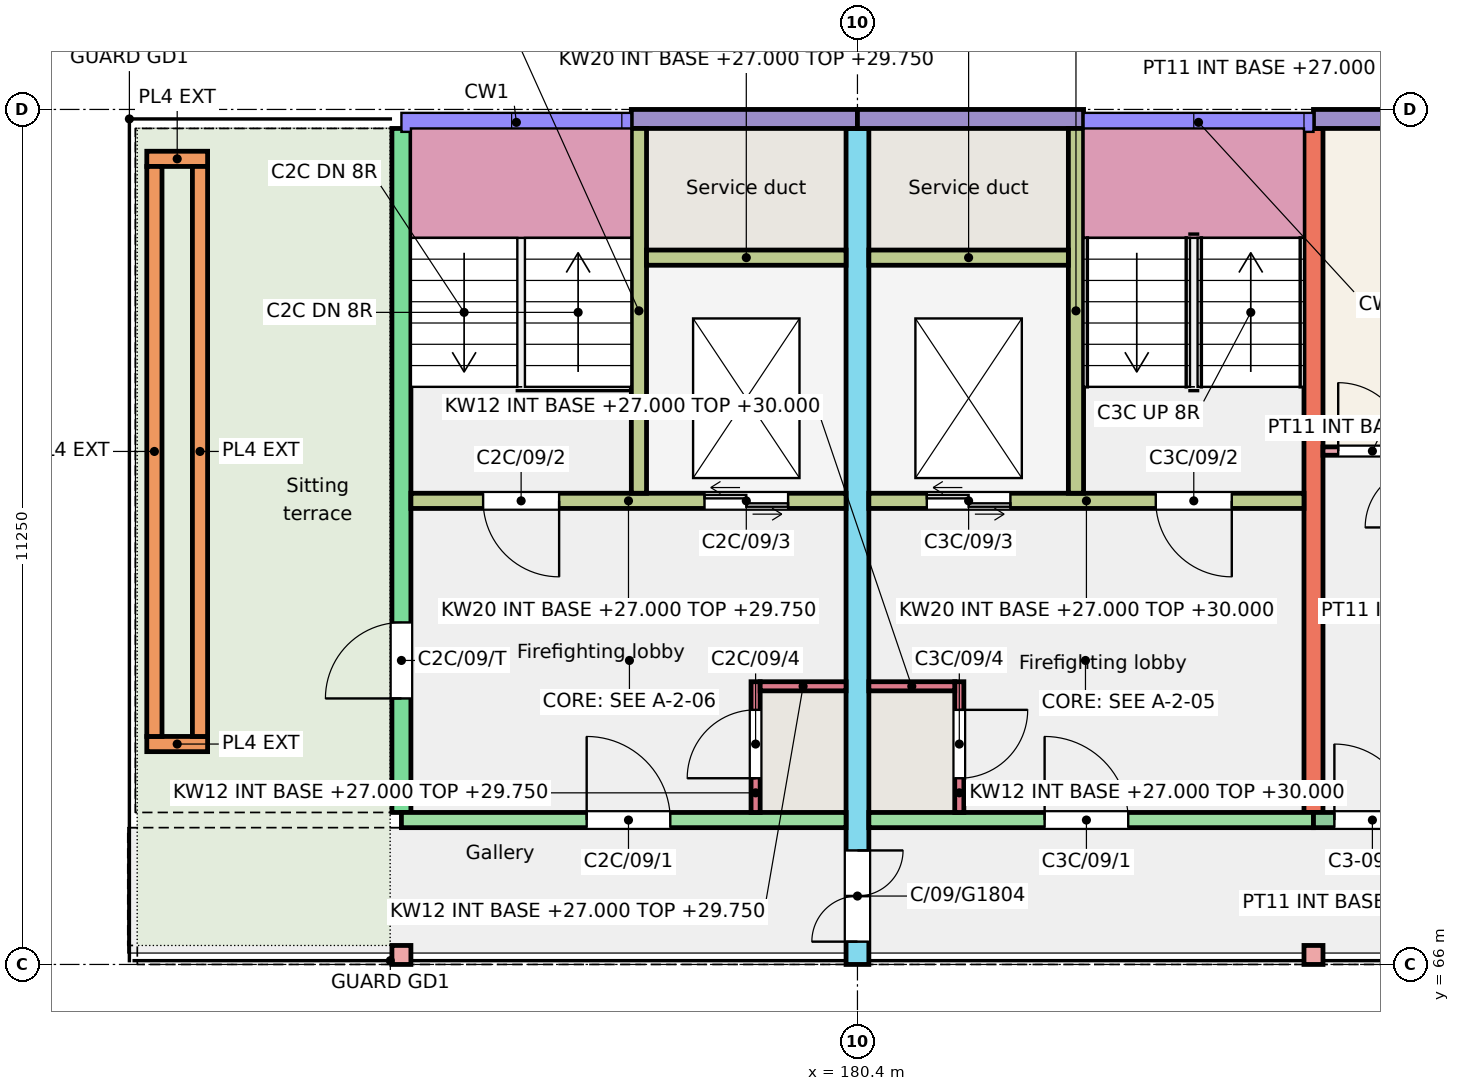
"""IFC4 building model, lengths in metres.
Left out: names, types, materials, properties, quantities, classifications, styles, units other than length and angle.
Written with IfcOpenShell. Run it as: python <this file> out.ifc"""

import sys

from ifc_helpers import new_model, si_unit, direction, frame, frame_2d, origin, origin_2d, place, context, subcontext, project, spatial, rectangle, extrude, element, fill, save


model = new_model("IFC4")
c1 = context("Model", 3, precision=1e-05, world=origin(), true_north=direction((0.0, 1.0)))
c2 = subcontext(c1, "Body", "Model", "MODEL_VIEW")
j1 = project(units=[si_unit("LENGTHUNIT", "METRE"), si_unit("PLANEANGLEUNIT", "RADIAN")], contexts=[c1])
p1 = place(None, origin())
s1 = spatial("IfcSite", under=j1, at=p1, CompositionType="ELEMENT")
p2 = place(p1, origin())
s2 = spatial("IfcBuilding", under=s1, at=p2, CompositionType="ELEMENT")
p3 = place(p2, frame((0.0, 0.0, 27.0)))
s3 = spatial("IfcBuildingStorey", under=s2, at=p3, CompositionType="ELEMENT", Elevation=27.0)
p4 = place(p3, frame((174.4, 68.0, 0.0), z_axis=(0.0, 0.0, 1.0), x_axis=(0.0, 1.0, 0.0)))
e1 = element("IfcWall", 1, at=p4, inside=s3, PredefinedType="SHEAR", context=c2, shape_type="SweptSolid", body=[
    extrude(rectangle(XDim=9.0, YDim=0.25, at=frame_2d((4.5, 0.0))), origin(), (0.0, 0.0, 1.0), 3.0),
])
p5 = place(p4, frame((1.5, 0.0, 0.0)))
e2 = element("IfcOpeningElement", 2, at=p5, cuts=e1, PredefinedType="OPENING", context=c2, shape_type="SweptSolid", body=[
    extrude(rectangle(XDim=1.0, YDim=2.1, at=frame_2d((0.5, 1.05))), frame((0.0, 0.135, 0.0), z_axis=(0.0, -1.0, 0.0), x_axis=(1.0, 0.0, 0.0)), (0.0, 0.0, 1.0), 0.27),
])
p6 = place(p3, frame((180.4, 66.0, 0.0), z_axis=(0.0, 0.0, 1.0), x_axis=(0.0, 1.0, 0.0)))
e3 = element("IfcWall", 3, at=p6, inside=s3, PredefinedType="SHEAR", context=c2, shape_type="SweptSolid", body=[
    extrude(rectangle(XDim=11.0, YDim=0.3, at=frame_2d((5.5, 0.0))), origin(), (0.0, 0.0, 1.0), 3.0),
])
p7 = place(p6, frame((0.3, 0.0, 0.0)))
e4 = element("IfcOpeningElement", 4, at=p7, cuts=e3, PredefinedType="OPENING", context=c2, shape_type="SweptSolid", body=[
    extrude(rectangle(XDim=1.2, YDim=2.1, at=frame_2d((0.6, 1.05))), frame((0.0, 0.16, 0.0), z_axis=(0.0, -1.0, 0.0), x_axis=(1.0, 0.0, 0.0)), (0.0, 0.0, 1.0), 0.32),
])
p8 = place(p3, frame((186.4, 68.0, 0.0), z_axis=(0.0, 0.0, 1.0), x_axis=(0.0, 1.0, 0.0)))
e5 = element("IfcWall", 5, at=p8, inside=s3, PredefinedType="SHEAR", context=c2, shape_type="SweptSolid", body=[
    extrude(rectangle(XDim=9.0, YDim=0.25, at=frame_2d((4.5, 0.0))), origin(), (0.0, 0.0, 1.0), 3.0),
])
p9 = place(p3, frame((177.425, 77.125, 0.0), z_axis=(0.0, 0.0, 1.0), x_axis=(1.0, 0.0, 0.0)))
e6 = element("IfcWall", 6, at=p9, inside=s3, PredefinedType="SOLIDWALL", context=c2, shape_type="SweptSolid", body=[
    extrude(rectangle(XDim=2.975, YDim=0.25, at=frame_2d((1.487, 0.0))), origin(), (0.0, 0.0, 1.0), 3.0),
])
p10 = place(p3, frame((174.4, 67.9, 0.0), z_axis=(0.0, 0.0, 1.0), x_axis=(1.0, 0.0, 0.0)))
e7 = element("IfcWall", 7, at=p10, inside=s3, PredefinedType="SHEAR", context=c2, shape_type="SweptSolid", body=[
    extrude(rectangle(XDim=5.85, YDim=0.2, at=frame_2d((2.925, 0.0))), origin(), (0.0, 0.0, 1.0), 2.75),
])
p11 = place(p10, frame((2.438, 0.0, 0.0)))
e8 = element("IfcOpeningElement", 8, at=p11, cuts=e7, PredefinedType="OPENING", context=c2, shape_type="SweptSolid", body=[
    extrude(rectangle(XDim=1.1, YDim=2.1, at=frame_2d((0.55, 1.05))), frame((0.0, 0.11, 0.0), z_axis=(0.0, -1.0, 0.0), x_axis=(1.0, 0.0, 0.0)), (0.0, 0.0, 1.0), 0.22),
])
p12 = place(p3, frame((174.525, 72.1, 0.0), z_axis=(0.0, 0.0, 1.0), x_axis=(1.0, 0.0, 0.0)))
e9 = element("IfcWall", 9, at=p12, inside=s3, PredefinedType="SHEAR", context=c2, shape_type="SweptSolid", body=[
    extrude(rectangle(XDim=5.725, YDim=0.2, at=frame_2d((2.863, 0.0))), origin(), (0.0, 0.0, 1.0), 2.75),
])
p13 = place(p12, frame((0.95, 0.0, 0.0)))
e10 = element("IfcOpeningElement", 10, at=p13, cuts=e9, PredefinedType="OPENING", context=c2, shape_type="SweptSolid", body=[
    extrude(rectangle(XDim=1.0, YDim=2.1, at=frame_2d((0.5, 1.05))), frame((0.0, 0.11, 0.0), z_axis=(0.0, -1.0, 0.0), x_axis=(1.0, 0.0, 0.0)), (0.0, 0.0, 1.0), 0.22),
])
p14 = place(p12, frame((3.863, 0.0, 0.0)))
e11 = element("IfcOpeningElement", 11, at=p14, cuts=e9, PredefinedType="OPENING", context=c2, shape_type="SweptSolid", body=[
    extrude(rectangle(XDim=1.1, YDim=2.1, at=frame_2d((0.55, 1.05))), frame((0.0, 0.11, 0.0), z_axis=(0.0, -1.0, 0.0), x_axis=(1.0, 0.0, 0.0)), (0.0, 0.0, 1.0), 0.22),
])
p15 = place(p3, frame((177.525, 72.2, 0.0), z_axis=(0.0, 0.0, 1.0), x_axis=(0.0, 1.0, 0.0)))
e12 = element("IfcWall", 12, at=p15, inside=s3, PredefinedType="SHEAR", context=c2, shape_type="SweptSolid", body=[
    extrude(rectangle(XDim=4.8, YDim=0.2, at=frame_2d((2.4, 0.0))), origin(), (0.0, 0.0, 1.0), 2.75),
])
p16 = place(p3, frame((177.625, 75.3, 0.0), z_axis=(0.0, 0.0, 1.0), x_axis=(1.0, 0.0, 0.0)))
e13 = element("IfcWall", 13, at=p16, inside=s3, PredefinedType="SHEAR", context=c2, shape_type="SweptSolid", body=[
    extrude(rectangle(XDim=2.625, YDim=0.2, at=frame_2d((1.312, 0.0))), origin(), (0.0, 0.0, 1.0), 2.75),
])
p17 = place(p3, frame((179.06, 68.0, 0.0), z_axis=(0.0, 0.0, 1.0), x_axis=(0.0, 1.0, 0.0)))
e14 = element("IfcWall", 14, at=p17, inside=s3, PredefinedType="SHEAR", context=c2, shape_type="SweptSolid", body=[
    extrude(rectangle(XDim=1.72, YDim=0.12, at=frame_2d((0.86, 0.0))), origin(), (0.0, 0.0, 1.0), 2.75),
])
p18 = place(p17, frame((0.45, 0.0, 0.0)))
e15 = element("IfcOpeningElement", 15, at=p18, cuts=e14, PredefinedType="OPENING", context=c2, shape_type="SweptSolid", body=[
    extrude(rectangle(XDim=0.9, YDim=2.1, at=frame_2d((0.45, 1.05))), frame((0.0, 0.07, 0.0), z_axis=(0.0, -1.0, 0.0), x_axis=(1.0, 0.0, 0.0)), (0.0, 0.0, 1.0), 0.14),
])
p19 = place(p3, frame((179.12, 69.66, 0.0), z_axis=(0.0, 0.0, 1.0), x_axis=(1.0, 0.0, 0.0)))
e16 = element("IfcWall", 16, at=p19, inside=s3, PredefinedType="SHEAR", context=c2, shape_type="SweptSolid", body=[
    extrude(rectangle(XDim=1.13, YDim=0.12, at=frame_2d((0.565, 0.0))), origin(), (0.0, 0.0, 1.0), 2.75),
])
p20 = place(p3, frame((180.4, 77.125, 0.0), z_axis=(0.0, 0.0, 1.0), x_axis=(1.0, 0.0, 0.0)))
e17 = element("IfcWall", 17, at=p20, inside=s3, PredefinedType="SOLIDWALL", context=c2, shape_type="SweptSolid", body=[
    extrude(rectangle(XDim=2.975, YDim=0.25, at=frame_2d((1.488, 0.0))), origin(), (0.0, 0.0, 1.0), 3.0),
])
p21 = place(p3, frame((180.55, 67.9, 0.0), z_axis=(0.0, 0.0, 1.0), x_axis=(1.0, 0.0, 0.0)))
e18 = element("IfcWall", 18, at=p21, inside=s3, PredefinedType="SHEAR", context=c2, shape_type="SweptSolid", body=[
    extrude(rectangle(XDim=5.85, YDim=0.2, at=frame_2d((2.925, 0.0))), origin(), (0.0, 0.0, 1.0), 3.0),
])
p22 = place(p21, frame((2.312, 0.0, 0.0)))
e19 = element("IfcOpeningElement", 19, at=p22, cuts=e18, PredefinedType="OPENING", context=c2, shape_type="SweptSolid", body=[
    extrude(rectangle(XDim=1.1, YDim=2.1, at=frame_2d((0.55, 1.05))), frame((0.0, 0.11, 0.0), z_axis=(0.0, -1.0, 0.0), x_axis=(1.0, 0.0, 0.0)), (0.0, 0.0, 1.0), 0.22),
])
p23 = place(p3, frame((180.55, 72.1, 0.0), z_axis=(0.0, 0.0, 1.0), x_axis=(1.0, 0.0, 0.0)))
e20 = element("IfcWall", 20, at=p23, inside=s3, PredefinedType="SHEAR", context=c2, shape_type="SweptSolid", body=[
    extrude(rectangle(XDim=5.725, YDim=0.2, at=frame_2d((2.862, 0.0))), origin(), (0.0, 0.0, 1.0), 3.0),
])
p24 = place(p23, frame((3.775, 0.0, 0.0)))
e21 = element("IfcOpeningElement", 21, at=p24, cuts=e20, PredefinedType="OPENING", context=c2, shape_type="SweptSolid", body=[
    extrude(rectangle(XDim=1.0, YDim=2.1, at=frame_2d((0.5, 1.05))), frame((0.0, 0.11, 0.0), z_axis=(0.0, -1.0, 0.0), x_axis=(1.0, 0.0, 0.0)), (0.0, 0.0, 1.0), 0.22),
])
p25 = place(p23, frame((0.762, 0.0, 0.0)))
e22 = element("IfcOpeningElement", 22, at=p25, cuts=e20, PredefinedType="OPENING", context=c2, shape_type="SweptSolid", body=[
    extrude(rectangle(XDim=1.1, YDim=2.1, at=frame_2d((0.55, 1.05))), frame((0.0, 0.11, 0.0), z_axis=(0.0, -1.0, 0.0), x_axis=(1.0, 0.0, 0.0)), (0.0, 0.0, 1.0), 0.22),
])
p26 = place(p3, frame((183.275, 72.2, 0.0), z_axis=(0.0, 0.0, 1.0), x_axis=(0.0, 1.0, 0.0)))
e23 = element("IfcWall", 23, at=p26, inside=s3, PredefinedType="SHEAR", context=c2, shape_type="SweptSolid", body=[
    extrude(rectangle(XDim=4.8, YDim=0.2, at=frame_2d((2.4, 0.0))), origin(), (0.0, 0.0, 1.0), 3.0),
])
p27 = place(p3, frame((180.55, 75.3, 0.0), z_axis=(0.0, 0.0, 1.0), x_axis=(1.0, 0.0, 0.0)))
e24 = element("IfcWall", 24, at=p27, inside=s3, PredefinedType="SHEAR", context=c2, shape_type="SweptSolid", body=[
    extrude(rectangle(XDim=2.625, YDim=0.2, at=frame_2d((1.312, 0.0))), origin(), (0.0, 0.0, 1.0), 3.0),
])
p28 = place(p3, frame((181.74, 68.0, 0.0), z_axis=(0.0, 0.0, 1.0), x_axis=(0.0, 1.0, 0.0)))
e25 = element("IfcWall", 25, at=p28, inside=s3, PredefinedType="SHEAR", context=c2, shape_type="SweptSolid", body=[
    extrude(rectangle(XDim=1.72, YDim=0.12, at=frame_2d((0.86, 0.0))), origin(), (0.0, 0.0, 1.0), 3.0),
])
p29 = place(p28, frame((0.45, 0.0, 0.0)))
e26 = element("IfcOpeningElement", 26, at=p29, cuts=e25, PredefinedType="OPENING", context=c2, shape_type="SweptSolid", body=[
    extrude(rectangle(XDim=0.9, YDim=2.1, at=frame_2d((0.45, 1.05))), frame((0.0, 0.07, 0.0), z_axis=(0.0, -1.0, 0.0), x_axis=(1.0, 0.0, 0.0)), (0.0, 0.0, 1.0), 0.14),
])
p30 = place(p3, frame((180.55, 69.66, 0.0), z_axis=(0.0, 0.0, 1.0), x_axis=(1.0, 0.0, 0.0)))
e27 = element("IfcWall", 27, at=p30, inside=s3, PredefinedType="SHEAR", context=c2, shape_type="SweptSolid", body=[
    extrude(rectangle(XDim=1.13, YDim=0.12, at=frame_2d((0.565, 0.0))), origin(), (0.0, 0.0, 1.0), 3.0),
])
p31 = place(p3, frame((186.4, 77.125, 0.0), z_axis=(0.0, 0.0, 1.0), x_axis=(1.0, 0.0, 0.0)))
e28 = element("IfcWall", 28, at=p31, inside=s3, PredefinedType="SOLIDWALL", context=c2, shape_type="SweptSolid", body=[
    extrude(rectangle(XDim=3.6, YDim=0.25, at=frame_2d((1.8, 0.0))), origin(), (0.0, 0.0, 1.0), 3.0),
])
p32 = place(p31, frame((1.062, 0.0, 0.9)))
e29 = element("IfcOpeningElement", 29, at=p32, cuts=e28, PredefinedType="OPENING", context=c2, shape_type="SweptSolid", body=[
    extrude(rectangle(XDim=1.5, YDim=1.5, at=frame_2d((0.75, 0.75))), frame((0.0, 0.135, 0.0), z_axis=(0.0, -1.0, 0.0), x_axis=(1.0, 0.0, 0.0)), (0.0, 0.0, 1.0), 0.27),
])
p33 = place(p3, frame((186.4, 67.9, 0.0), z_axis=(0.0, 0.0, 1.0), x_axis=(1.0, 0.0, 0.0)))
e30 = element("IfcWall", 30, at=p33, inside=s3, PredefinedType="SOLIDWALL", context=c2, shape_type="SweptSolid", body=[
    extrude(rectangle(XDim=3.6, YDim=0.2, at=frame_2d((1.8, 0.0))), origin(), (0.0, 0.0, 1.0), 3.0),
])
p34 = place(p33, frame((1.917, 0.0, 1.1)))
e31 = element("IfcOpeningElement", 31, at=p34, cuts=e30, PredefinedType="OPENING", context=c2, shape_type="SweptSolid", body=[
    extrude(rectangle(XDim=1.2, YDim=1.3, at=frame_2d((0.6, 0.65))), frame((0.0, 0.11, 0.0), z_axis=(0.0, -1.0, 0.0), x_axis=(1.0, 0.0, 0.0)), (0.0, 0.0, 1.0), 0.22),
])
p35 = place(p33, frame((0.275, 0.0, 0.0)))
e32 = element("IfcOpeningElement", 32, at=p35, cuts=e30, PredefinedType="OPENING", context=c2, shape_type="SweptSolid", body=[
    extrude(rectangle(XDim=1.0, YDim=2.1, at=frame_2d((0.5, 1.05))), frame((0.0, 0.11, 0.0), z_axis=(0.0, -1.0, 0.0), x_axis=(1.0, 0.0, 0.0)), (0.0, 0.0, 1.0), 0.22),
])
for number, where, z_axis, x_axis in (
    (33, (174.4, 66.125, 0.0), (0.0, 0.0, 1.0), (1.0, 0.0, 0.0)),
    (34, (186.4, 66.125, 0.0), (0.0, 0.0, 1.0), (1.0, 0.0, 0.0)),
):
    element("IfcColumn", number, at=place(p3, frame(where, z_axis=z_axis, x_axis=x_axis)), inside=s3, PredefinedType="COLUMN", context=c2, shape_type="SweptSolid", body=[
        extrude(rectangle(XDim=0.25, YDim=0.25, at=origin_2d()), origin(), (0.0, 0.0, 1.0), 3.0),
    ])
for number, where, z_axis, x_axis in (
    (35, (171.05, 68.9, 0.01), (0.0, 0.0, 1.0), (1.0, 0.0, 0.0)),
    (36, (171.05, 76.6, 0.01), (0.0, 0.0, 1.0), (1.0, 0.0, 0.0)),
):
    element("IfcWall", number, at=place(p3, frame(where, z_axis=z_axis, x_axis=x_axis)), inside=s3, PredefinedType="SOLIDWALL", context=c2, shape_type="SweptSolid", body=[
        extrude(rectangle(XDim=0.8, YDim=0.2, at=frame_2d((0.4, 0.0))), origin(), (0.0, 0.0, 1.0), 0.45),
    ])
for number, where, z_axis, x_axis in (
    (37, (171.15, 69.0, 0.01), (0.0, 0.0, 1.0), (0.0, 1.0, 0.0)),
    (38, (171.75, 69.0, 0.01), (0.0, 0.0, 1.0), (0.0, 1.0, 0.0)),
):
    element("IfcWall", number, at=place(p3, frame(where, z_axis=z_axis, x_axis=x_axis)), inside=s3, PredefinedType="SOLIDWALL", context=c2, shape_type="SweptSolid", body=[
        extrude(rectangle(XDim=7.5, YDim=0.2, at=frame_2d((3.75, 0.0))), origin(), (0.0, 0.0, 1.0), 0.45),
    ])
p36 = place(p3, frame((186.525, 72.755, 0.0), z_axis=(0.0, 0.0, 1.0), x_axis=(1.0, 0.0, 0.0)))
e39 = element("IfcWall", 39, at=p36, inside=s3, PredefinedType="PARTITIONING", context=c2, shape_type="SweptSolid", body=[
    extrude(rectangle(XDim=3.375, YDim=0.11, at=frame_2d((1.688, 0.0))), origin(), (0.0, 0.0, 1.0), 2.8),
])
p37 = place(p36, frame((0.2, 0.0, 0.0)))
e40 = element("IfcOpeningElement", 40, at=p37, cuts=e39, PredefinedType="OPENING", context=c2, shape_type="SweptSolid", body=[
    extrude(rectangle(XDim=0.9, YDim=2.1, at=frame_2d((0.45, 1.05))), frame((0.0, 0.065, 0.0), z_axis=(0.0, -1.0, 0.0), x_axis=(1.0, 0.0, 0.0)), (0.0, 0.0, 1.0), 0.13),
])
p38 = place(p35, origin())
e41 = element("IfcDoor", 41, at=p38, inside=s3, OperationType="SINGLE_SWING_LEFT", PredefinedType="DOOR", context=c2, shape_type="SweptSolid", body=[
    extrude(rectangle(XDim=1.0, YDim=2.1, at=frame_2d((0.5, 1.05))), frame((0.0, 0.025, 0.0), z_axis=(0.0, -1.0, 0.0), x_axis=(1.0, 0.0, 0.0)), (0.0, 0.0, 1.0), 0.05),
])
fill(e32, e41)
p39 = place(p37, origin())
e42 = element("IfcDoor", 42, at=p39, inside=s3, OperationType="SINGLE_SWING_LEFT", PredefinedType="DOOR", context=c2, shape_type="SweptSolid", body=[
    extrude(rectangle(XDim=0.9, YDim=2.1, at=frame_2d((0.45, 1.05))), frame((0.0, 0.025, 0.0), z_axis=(0.0, -1.0, 0.0), x_axis=(1.0, 0.0, 0.0)), (0.0, 0.0, 1.0), 0.05),
])
fill(e40, e42)
p40 = place(p11, origin())
e43 = element("IfcDoor", 43, at=p40, inside=s3, OperationType="SINGLE_SWING_LEFT", PredefinedType="DOOR", context=c2, shape_type="SweptSolid", body=[
    extrude(rectangle(XDim=1.1, YDim=2.1, at=frame_2d((0.55, 1.05))), frame((0.0, 0.025, 0.0), z_axis=(0.0, -1.0, 0.0), x_axis=(1.0, 0.0, 0.0)), (0.0, 0.0, 1.0), 0.05),
])
fill(e8, e43)
p41 = place(p13, origin())
e44 = element("IfcDoor", 44, at=p41, inside=s3, OperationType="SINGLE_SWING_RIGHT", PredefinedType="DOOR", context=c2, shape_type="SweptSolid", body=[
    extrude(rectangle(XDim=1.0, YDim=2.1, at=frame_2d((0.5, 1.05))), frame((0.0, 0.025, 0.0), z_axis=(0.0, -1.0, 0.0), x_axis=(1.0, 0.0, 0.0)), (0.0, 0.0, 1.0), 0.05),
])
fill(e10, e44)
p42 = place(p14, origin())
e45 = element("IfcDoor", 45, at=p42, inside=s3, OperationType="DOUBLE_DOOR_SLIDING", PredefinedType="DOOR", context=c2, shape_type="SweptSolid", body=[
    extrude(rectangle(XDim=1.1, YDim=2.1, at=frame_2d((0.55, 1.05))), frame((0.0, 0.025, 0.0), z_axis=(0.0, -1.0, 0.0), x_axis=(1.0, 0.0, 0.0)), (0.0, 0.0, 1.0), 0.05),
])
fill(e11, e45)
p43 = place(p18, origin())
e46 = element("IfcDoor", 46, at=p43, inside=s3, OperationType="SINGLE_SWING_LEFT", PredefinedType="DOOR", context=c2, shape_type="SweptSolid", body=[
    extrude(rectangle(XDim=0.9, YDim=2.1, at=frame_2d((0.45, 1.05))), frame((0.0, 0.025, 0.0), z_axis=(0.0, -1.0, 0.0), x_axis=(1.0, 0.0, 0.0)), (0.0, 0.0, 1.0), 0.05),
])
fill(e15, e46)
p44 = place(p22, origin())
e47 = element("IfcDoor", 47, at=p44, inside=s3, OperationType="SINGLE_SWING_LEFT", PredefinedType="DOOR", context=c2, shape_type="SweptSolid", body=[
    extrude(rectangle(XDim=1.1, YDim=2.1, at=frame_2d((0.55, 1.05))), frame((0.0, 0.025, 0.0), z_axis=(0.0, -1.0, 0.0), x_axis=(1.0, 0.0, 0.0)), (0.0, 0.0, 1.0), 0.05),
])
fill(e19, e47)
p45 = place(p24, origin())
e48 = element("IfcDoor", 48, at=p45, inside=s3, OperationType="SINGLE_SWING_RIGHT", PredefinedType="DOOR", context=c2, shape_type="SweptSolid", body=[
    extrude(rectangle(XDim=1.0, YDim=2.1, at=frame_2d((0.5, 1.05))), frame((0.0, 0.025, 0.0), z_axis=(0.0, -1.0, 0.0), x_axis=(1.0, 0.0, 0.0)), (0.0, 0.0, 1.0), 0.05),
])
fill(e21, e48)
p46 = place(p25, origin())
e49 = element("IfcDoor", 49, at=p46, inside=s3, OperationType="DOUBLE_DOOR_SLIDING", PredefinedType="DOOR", context=c2, shape_type="SweptSolid", body=[
    extrude(rectangle(XDim=1.1, YDim=2.1, at=frame_2d((0.55, 1.05))), frame((0.0, 0.025, 0.0), z_axis=(0.0, -1.0, 0.0), x_axis=(1.0, 0.0, 0.0)), (0.0, 0.0, 1.0), 0.05),
])
fill(e22, e49)
p47 = place(p29, origin())
e50 = element("IfcDoor", 50, at=p47, inside=s3, OperationType="SINGLE_SWING_RIGHT", PredefinedType="DOOR", context=c2, shape_type="SweptSolid", body=[
    extrude(rectangle(XDim=0.9, YDim=2.1, at=frame_2d((0.45, 1.05))), frame((0.0, 0.025, 0.0), z_axis=(0.0, -1.0, 0.0), x_axis=(1.0, 0.0, 0.0)), (0.0, 0.0, 1.0), 0.05),
])
fill(e26, e50)
p48 = place(p5, origin())
e51 = element("IfcDoor", 51, at=p48, inside=s3, OperationType="SINGLE_SWING_LEFT", PredefinedType="DOOR", context=c2, shape_type="SweptSolid", body=[
    extrude(rectangle(XDim=1.0, YDim=2.1, at=frame_2d((0.5, 1.05))), frame((0.0, 0.025, 0.0), z_axis=(0.0, -1.0, 0.0), x_axis=(1.0, 0.0, 0.0)), (0.0, 0.0, 1.0), 0.05),
])
fill(e2, e51)
p49 = place(p7, origin())
e52 = element("IfcDoor", 52, at=p49, inside=s3, OperationType="DOUBLE_DOOR_SINGLE_SWING", PredefinedType="DOOR", context=c2, shape_type="SweptSolid", body=[
    extrude(rectangle(XDim=1.2, YDim=2.1, at=frame_2d((0.6, 1.05))), frame((0.0, 0.025, 0.0), z_axis=(0.0, -1.0, 0.0), x_axis=(1.0, 0.0, 0.0)), (0.0, 0.0, 1.0), 0.05),
])
fill(e4, e52)
save(model, sys.argv[1])
